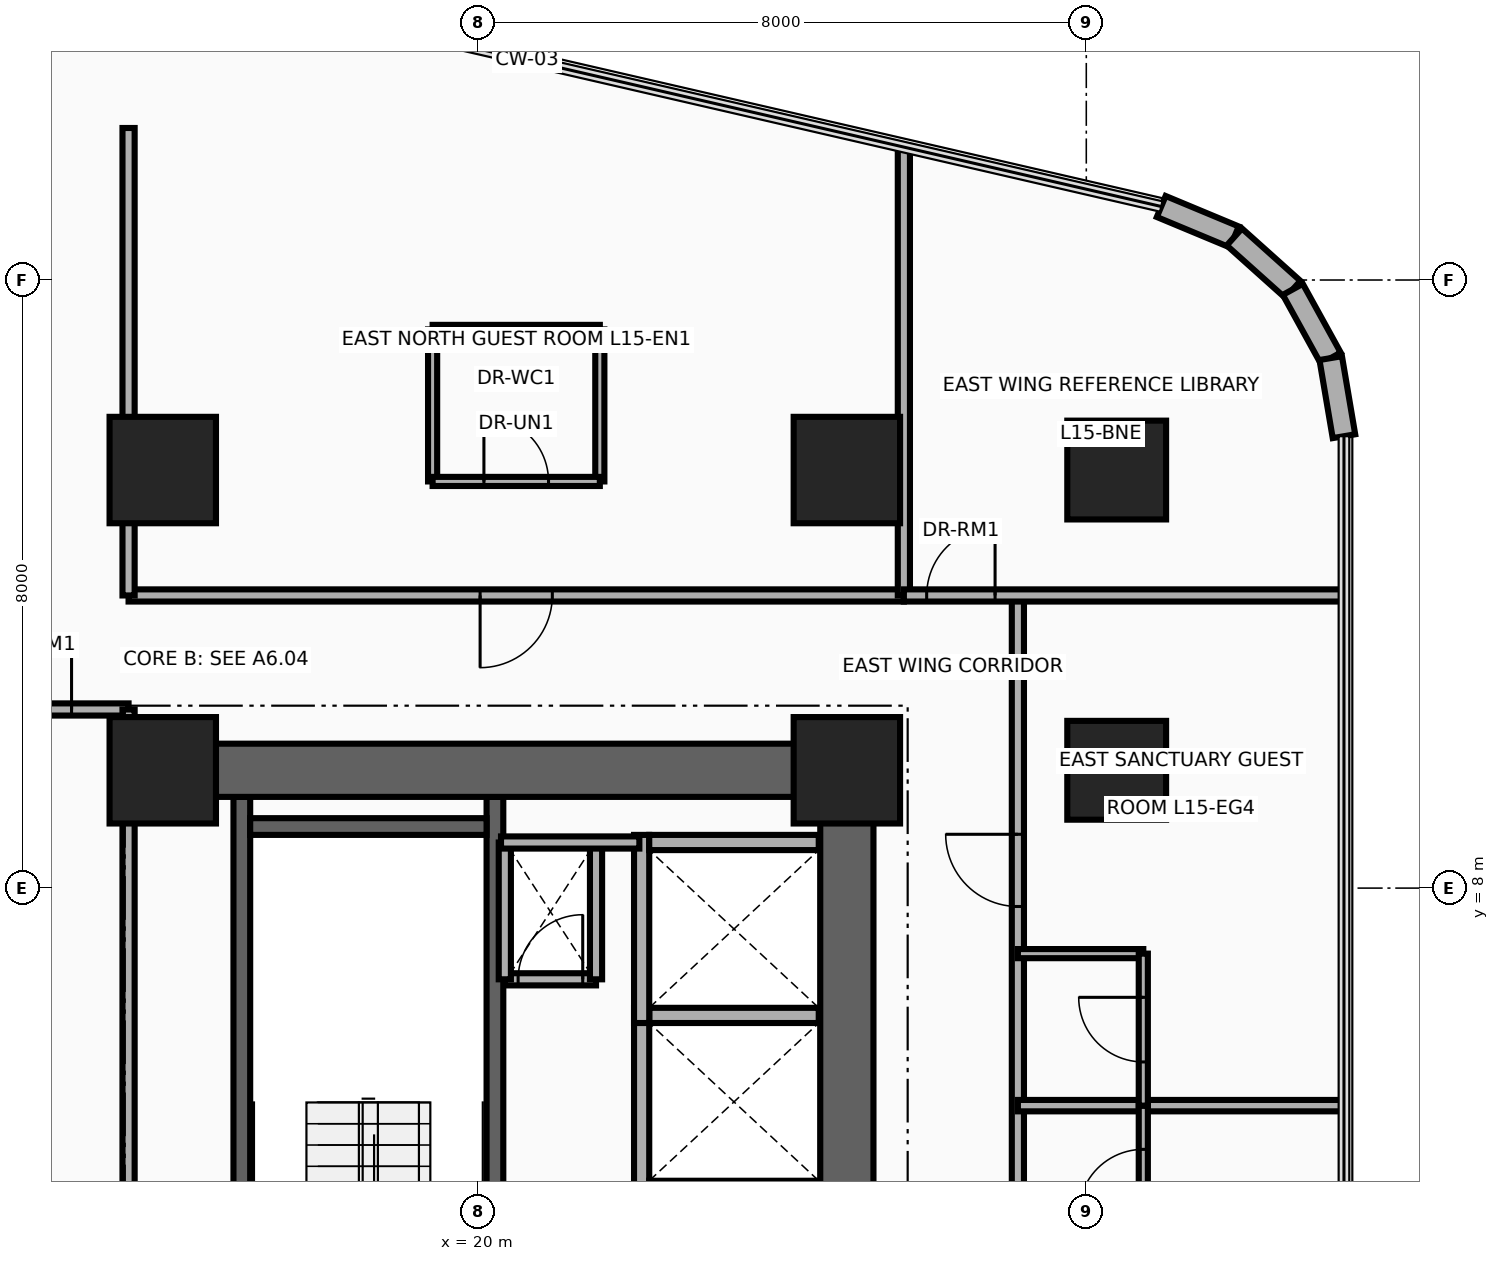
"""IFC4 building model, lengths in metres.
Left out: names, types, materials, properties, quantities, classifications, styles, units other than length and angle.
Written with IfcOpenShell. Run it as: python <this file> out.ifc"""

import sys

from ifc_helpers import new_model, si_unit, direction, frame, frame_2d, origin, origin_2d, place, context, subcontext, project, spatial, rectangle, circle, extrude, source, transform, mapped, element, fill, save


model = new_model("IFC4")
c1 = context("Model", 3, precision=1e-05, world=origin(), true_north=direction((0.0, 1.0)))
c2 = subcontext(c1, "Body", "Model", "MODEL_VIEW")
j1 = project(units=[si_unit("LENGTHUNIT", "METRE"), si_unit("PLANEANGLEUNIT", "RADIAN")], contexts=[c1])
p1 = place(None, origin())
s1 = spatial("IfcSite", under=j1, at=p1, CompositionType="ELEMENT")
p2 = place(p1, origin())
s2 = spatial("IfcBuilding", under=s1, at=p2, CompositionType="ELEMENT")
p3 = place(p2, frame((0.0, 0.0, 63.0)))
s3 = spatial("IfcBuildingStorey", under=s2, at=p3, CompositionType="ELEMENT", Elevation=63.0)
for number, where, z_axis, x_axis in (
    (1, (16.89, 0.68, 0.0), (0.0, 0.0, 1.0), (0.0, 1.0, 0.0)),
    (2, (20.22, 0.68, 0.0), (0.0, 0.0, 1.0), (0.0, 1.0, 0.0)),
):
    element("IfcWall", number, at=place(p3, frame(where, z_axis=z_axis, x_axis=x_axis)), inside=s3, PredefinedType="SHEAR", context=c2, shape_type="SweptSolid", body=[
        extrude(rectangle(XDim=8.52, YDim=0.22, at=frame_2d((4.26, 0.0))), origin(), (0.0, 0.0, 1.0), 3.46),
    ])
p4 = place(p3, frame((17.0, 8.81, 0.0), z_axis=(0.0, 0.0, 1.0), x_axis=(1.0, 0.0, 0.0)))
e3 = element("IfcWall", 3, at=p4, inside=s3, PredefinedType="SHEAR", context=c2, shape_type="SweptSolid", body=[
    extrude(rectangle(XDim=3.11, YDim=0.22, at=frame_2d((1.555, 0.0))), origin(), (0.0, 0.0, 1.0), 3.46),
])
p5 = place(p3, frame((24.85, 0.95, 0.0), z_axis=(0.0, 0.0, 1.0), x_axis=(0.0, 1.0, 0.0)))
e4 = element("IfcWall", 4, at=p5, inside=s3, PredefinedType="SHEAR", context=c2, shape_type="SweptSolid", body=[
    extrude(rectangle(XDim=8.95, YDim=0.7, at=frame_2d((4.475, 0.0))), origin(), (0.0, 0.0, 1.0), 3.46),
])
p6 = place(p3, frame((15.85, 9.55, 0.0), z_axis=(0.0, 0.0, 1.0), x_axis=(1.0, 0.0, 0.0)))
e5 = element("IfcWall", 5, at=p6, inside=s3, PredefinedType="SHEAR", context=c2, shape_type="SweptSolid", body=[
    extrude(rectangle(XDim=9.0, YDim=0.7, at=frame_2d((4.5, 0.0))), origin(), (0.0, 0.0, 1.0), 3.46),
])
m1 = source(origin(), c2, "Body", "SweptSolid", [
    extrude(rectangle(XDim=1.4, YDim=1.4, at=origin_2d()), origin(), (0.0, 0.0, 1.0), 3.7),
])
for number, where, z_axis, x_axis in (
    (6, (15.85, 9.55, 0.0), (0.0, 0.0, 1.0), (1.0, 0.0, 0.0)),
    (7, (24.85, 9.55, 0.0), (0.0, 0.0, 1.0), (1.0, 0.0, 0.0)),
):
    element("IfcColumn", number, at=place(p3, frame(where, z_axis=z_axis, x_axis=x_axis)), inside=s3, PredefinedType="COLUMN", context=c2, shape_type="MappedRepresentation", body=[
        mapped(m1, transform((0.0, 0.0, 0.0), x_axis=(1.0, 0.0, 0.0), y_axis=(0.0, 1.0, 0.0), z_axis=(0.0, 0.0, 1.0), scale=1.0)),
    ])
m2 = source(origin(), c2, "Body", "SweptSolid", [
    extrude(circle(Radius=0.65, at=origin_2d()), origin(), (0.0, 0.0, 1.0), 3.7),
])
p7 = place(p3, frame((28.4, 9.55, 0.0), z_axis=(0.0, 0.0, 1.0), x_axis=(1.0, 0.0, 0.0)))
e8 = element("IfcColumn", 8, at=p7, inside=s3, PredefinedType="COLUMN", context=c2, shape_type="MappedRepresentation", body=[
    mapped(m2, transform((0.0, 0.0, 0.0), x_axis=(1.0, 0.0, 0.0), y_axis=(0.0, 1.0, 0.0), z_axis=(0.0, 0.0, 1.0), scale=1.0)),
])
for number, where, z_axis, x_axis in (
    (9, (15.85, 13.5, 0.0), (0.0, 0.0, 1.0), (1.0, 0.0, 0.0)),
    (10, (24.85, 13.5, 0.0), (0.0, 0.0, 1.0), (1.0, 0.0, 0.0)),
):
    element("IfcColumn", number, at=place(p3, frame(where, z_axis=z_axis, x_axis=x_axis)), inside=s3, PredefinedType="COLUMN", context=c2, shape_type="MappedRepresentation", body=[
        mapped(m1, transform((0.0, 0.0, 0.0), x_axis=(1.0, 0.0, 0.0), y_axis=(0.0, 1.0, 0.0), z_axis=(0.0, 0.0, 1.0), scale=1.0)),
    ])
p8 = place(p3, frame((28.4, 13.5, 0.0), z_axis=(0.0, 0.0, 1.0), x_axis=(1.0, 0.0, 0.0)))
e11 = element("IfcColumn", 11, at=p8, inside=s3, PredefinedType="COLUMN", context=c2, shape_type="MappedRepresentation", body=[
    mapped(m2, transform((0.0, 0.0, 0.0), x_axis=(1.0, 0.0, 0.0), y_axis=(0.0, 1.0, 0.0), z_axis=(0.0, 0.0, 1.0), scale=1.0)),
])
p9 = place(p3, frame((28.986, 16.967, 0.0), z_axis=(0.0, 0.0, 1.0), x_axis=(0.923083852684, -0.384598753136, 0.0)))
e12 = element("IfcWall", 12, at=p9, inside=s3, PredefinedType="SOLIDWALL", context=c2, shape_type="SweptSolid", body=[
    extrude(rectangle(XDim=1.042, YDim=0.3, at=frame_2d((0.521, 0.0))), origin(), (0.0, 0.0, 1.0), 3.46),
])
p10 = place(p3, frame((29.948, 16.566, 0.0), z_axis=(0.0, 0.0, 1.0), x_axis=(0.744585645533, -0.66752694063, 0.0)))
e13 = element("IfcWall", 13, at=p10, inside=s3, PredefinedType="SOLIDWALL", context=c2, shape_type="SweptSolid", body=[
    extrude(rectangle(XDim=1.033, YDim=0.3, at=frame_2d((0.517, 0.0))), origin(), (0.0, 0.0, 1.0), 3.46),
])
p11 = place(p3, frame((30.717, 15.877, 0.0), z_axis=(0.0, 0.0, 1.0), x_axis=(0.482971098131, -0.875636293429, 0.0)))
e14 = element("IfcWall", 14, at=p11, inside=s3, PredefinedType="SOLIDWALL", context=c2, shape_type="SweptSolid", body=[
    extrude(rectangle(XDim=1.033, YDim=0.3, at=frame_2d((0.516, 0.0))), origin(), (0.0, 0.0, 1.0), 3.46),
])
p12 = place(p3, frame((31.216, 14.973, 0.0), z_axis=(0.0, 0.0, 1.0), x_axis=(0.167019462117, -0.985953598946, 0.0)))
e15 = element("IfcWall", 15, at=p12, inside=s3, PredefinedType="SOLIDWALL", context=c2, shape_type="SweptSolid", body=[
    extrude(rectangle(XDim=1.042, YDim=0.3, at=frame_2d((0.521, 0.0))), origin(), (0.0, 0.0, 1.0), 3.46),
])
p13 = place(p3, frame((22.15, 3.95, 0.0), z_axis=(0.0, 0.0, 1.0), x_axis=(0.0, 1.0, 0.0)))
e16 = element("IfcWall", 16, at=p13, inside=s3, PredefinedType="MOVABLE", context=c2, shape_type="SweptSolid", body=[
    extrude(rectangle(XDim=2.475, YDim=0.2, at=frame_2d((1.238, 0.0))), origin(), (0.0, 0.0, 1.0), 3.46),
])
for number, where, z_axis, x_axis in (
    (17, (22.25, 4.05, 0.0), (0.0, 0.0, 1.0), (1.0, 0.0, 0.0)),
    (18, (22.25, 6.325, 0.0), (0.0, 0.0, 1.0), (1.0, 0.0, 0.0)),
):
    element("IfcWall", number, at=place(p3, frame(where, z_axis=z_axis, x_axis=x_axis)), inside=s3, PredefinedType="MOVABLE", context=c2, shape_type="SweptSolid", body=[
        extrude(rectangle(XDim=2.23, YDim=0.2, at=frame_2d((1.115, 0.0))), origin(), (0.0, 0.0, 1.0), 2.245),
    ])
p14 = place(p3, frame((22.15, 6.225, 0.0), z_axis=(0.0, 0.0, 1.0), x_axis=(0.0, 1.0, 0.0)))
e19 = element("IfcWall", 19, at=p14, inside=s3, PredefinedType="MOVABLE", context=c2, shape_type="SweptSolid", body=[
    extrude(rectangle(XDim=2.475, YDim=0.2, at=frame_2d((1.237, 0.0))), origin(), (0.0, 0.0, 1.0), 3.46),
])
p15 = place(p3, frame((22.25, 8.6, 0.0), z_axis=(0.0, 0.0, 1.0), x_axis=(1.0, 0.0, 0.0)))
e20 = element("IfcWall", 20, at=p15, inside=s3, PredefinedType="MOVABLE", context=c2, shape_type="SweptSolid", body=[
    extrude(rectangle(XDim=2.23, YDim=0.2, at=frame_2d((1.115, 0.0))), origin(), (0.0, 0.0, 1.0), 2.245),
])
p16 = place(p3, frame((20.35, 6.8, 0.0), z_axis=(0.0, 0.0, 1.0), x_axis=(1.0, 0.0, 0.0)))
e21 = element("IfcWall", 21, at=p16, inside=s3, PredefinedType="PARTITIONING", context=c2, shape_type="SweptSolid", body=[
    extrude(rectangle(XDim=1.2, YDim=0.16, at=frame_2d((0.6, 0.0))), origin(), (0.0, 0.0, 1.0), 3.46),
])
p17 = place(p16, frame((0.175, 0.0, 0.0)))
e22 = element("IfcOpeningElement", 22, at=p17, cuts=e21, PredefinedType="OPENING", context=c2, shape_type="SweptSolid", body=[
    extrude(rectangle(XDim=0.85, YDim=2.05, at=frame_2d((0.425, 1.025))), frame((0.0, 0.095, 0.0), z_axis=(0.0, -1.0, 0.0), x_axis=(1.0, 0.0, 0.0)), (0.0, 0.0, 1.0), 0.19),
])
for number, where, z_axis, x_axis in (
    (23, (21.55, 6.8, 0.0), (0.0, 0.0, 1.0), (0.0, 1.0, 0.0)),
    (24, (20.35, 6.8, 0.0), (0.0, 0.0, 1.0), (0.0, 1.0, 0.0)),
):
    element("IfcWall", number, at=place(p3, frame(where, z_axis=z_axis, x_axis=x_axis)), inside=s3, PredefinedType="PARTITIONING", context=c2, shape_type="SweptSolid", body=[
        extrude(rectangle(XDim=1.8, YDim=0.16, at=frame_2d((0.9, 0.0))), origin(), (0.0, 0.0, 1.0), 3.46),
    ])
p18 = place(p3, frame((20.3, 8.6, 0.0), z_axis=(0.0, 0.0, 1.0), x_axis=(1.0, 0.0, 0.0)))
e25 = element("IfcWall", 25, at=p18, inside=s3, PredefinedType="PARTITIONING", context=c2, shape_type="SweptSolid", body=[
    extrude(rectangle(XDim=1.82, YDim=0.16, at=frame_2d((0.91, 0.0))), origin(), (0.0, 0.0, 1.0), 3.46),
])
p19 = place(p3, frame((15.4, 11.85, 0.0), z_axis=(0.0, 0.0, 1.0), x_axis=(1.0, 0.0, 0.0)))
e26 = element("IfcWall", 26, at=p19, inside=s3, PredefinedType="PARTITIONING", context=c2, shape_type="SweptSolid", body=[
    extrude(rectangle(XDim=10.2, YDim=0.16, at=frame_2d((5.1, 0.0))), origin(), (0.0, 0.0, 1.0), 2.834),
])
p20 = place(p19, frame((4.625, 0.0, 0.0)))
e27 = element("IfcOpeningElement", 27, at=p20, cuts=e26, PredefinedType="OPENING", context=c2, shape_type="SweptSolid", body=[
    extrude(rectangle(XDim=0.95, YDim=2.15, at=frame_2d((0.475, 1.075))), frame((0.0, 0.095, 0.0), z_axis=(0.0, -1.0, 0.0), x_axis=(1.0, 0.0, 0.0)), (0.0, 0.0, 1.0), 0.19),
])
p21 = place(p3, frame((15.4, 11.85, 0.0), z_axis=(0.0, 0.0, 1.0), x_axis=(0.0, 1.0, 0.0)))
e28 = element("IfcWall", 28, at=p21, inside=s3, PredefinedType="PARTITIONING", context=c2, shape_type="SweptSolid", body=[
    extrude(rectangle(XDim=6.15, YDim=0.16, at=frame_2d((3.075, 0.0))), origin(), (0.0, 0.0, 1.0), 2.583),
])
p22 = place(p3, frame((25.6, 11.85, 0.0), z_axis=(0.0, 0.0, 1.0), x_axis=(0.0, 1.0, 0.0)))
e29 = element("IfcWall", 29, at=p22, inside=s3, PredefinedType="PARTITIONING", context=c2, shape_type="SweptSolid", body=[
    extrude(rectangle(XDim=5.898, YDim=0.16, at=frame_2d((2.949, 0.0))), origin(), (0.0, 0.0, 1.0), 2.583),
])
for number, where, z_axis, x_axis in (
    (30, (19.4, 13.35, 0.0), (0.0, 0.0, 1.0), (0.0, 1.0, 0.0)),
    (31, (21.6, 13.35, 0.0), (0.0, 0.0, 1.0), (0.0, 1.0, 0.0)),
):
    element("IfcWall", number, at=place(p3, frame(where, z_axis=z_axis, x_axis=x_axis)), inside=s3, PredefinedType="PARTITIONING", context=c2, shape_type="SweptSolid", body=[
        extrude(rectangle(XDim=2.0, YDim=0.12, at=frame_2d((1.0, 0.0))), origin(), (0.0, 0.0, 1.0), 2.583),
    ])
p23 = place(p3, frame((19.4, 15.35, 0.0), z_axis=(0.0, 0.0, 1.0), x_axis=(1.0, 0.0, 0.0)))
e32 = element("IfcWall", 32, at=p23, inside=s3, PredefinedType="PARTITIONING", context=c2, shape_type="SweptSolid", body=[
    extrude(rectangle(XDim=2.2, YDim=0.12, at=frame_2d((1.1, 0.0))), origin(), (0.0, 0.0, 1.0), 3.46),
])
p24 = place(p3, frame((19.4, 13.35, 0.0), z_axis=(0.0, 0.0, 1.0), x_axis=(1.0, 0.0, 0.0)))
e33 = element("IfcWall", 33, at=p24, inside=s3, PredefinedType="PARTITIONING", context=c2, shape_type="SweptSolid", body=[
    extrude(rectangle(XDim=2.2, YDim=0.12, at=frame_2d((1.1, 0.0))), origin(), (0.0, 0.0, 1.0), 2.583),
])
p25 = place(p24, frame((0.675, 0.0, 0.0)))
e34 = element("IfcOpeningElement", 34, at=p25, cuts=e33, PredefinedType="OPENING", context=c2, shape_type="SweptSolid", body=[
    extrude(rectangle(XDim=0.85, YDim=2.1, at=frame_2d((0.425, 1.05))), frame((0.0, 0.075, 0.0), z_axis=(0.0, -1.0, 0.0), x_axis=(1.0, 0.0, 0.0)), (0.0, 0.0, 1.0), 0.15),
])
p26 = place(p3, frame((27.1, -13.89, 0.0), z_axis=(0.0, 0.0, 1.0), x_axis=(0.0, 1.0, 0.0)))
e35 = element("IfcWall", 35, at=p26, inside=s3, PredefinedType="PARTITIONING", context=c2, shape_type="SweptSolid", body=[
    extrude(rectangle(XDim=25.74, YDim=0.16, at=frame_2d((12.87, 0.0))), origin(), (0.0, 0.0, 1.0), 2.583),
])
p27 = place(p26, frame((2.62, 0.0, 0.0)))
e36 = element("IfcOpeningElement", 36, at=p27, cuts=e35, PredefinedType="OPENING", context=c2, shape_type="SweptSolid", body=[
    extrude(rectangle(XDim=0.95, YDim=2.15, at=frame_2d((0.475, 1.075))), frame((0.0, 0.095, 0.0), z_axis=(0.0, -1.0, 0.0), x_axis=(1.0, 0.0, 0.0)), (0.0, 0.0, 1.0), 0.19),
])
p28 = place(p26, frame((8.484, 0.0, 0.0)))
e37 = element("IfcOpeningElement", 37, at=p28, cuts=e35, PredefinedType="OPENING", context=c2, shape_type="SweptSolid", body=[
    extrude(rectangle(XDim=0.95, YDim=2.15, at=frame_2d((0.475, 1.075))), frame((0.0, 0.095, 0.0), z_axis=(0.0, -1.0, 0.0), x_axis=(1.0, 0.0, 0.0)), (0.0, 0.0, 1.0), 0.19),
])
p29 = place(p26, frame((14.197, 0.0, 0.0)))
e38 = element("IfcOpeningElement", 38, at=p29, cuts=e35, PredefinedType="OPENING", context=c2, shape_type="SweptSolid", body=[
    extrude(rectangle(XDim=0.95, YDim=2.15, at=frame_2d((0.475, 1.075))), frame((0.0, 0.095, 0.0), z_axis=(0.0, -1.0, 0.0), x_axis=(1.0, 0.0, 0.0)), (0.0, 0.0, 1.0), 0.19),
])
p30 = place(p26, frame((21.648, 0.0, 0.0)))
e39 = element("IfcOpeningElement", 39, at=p30, cuts=e35, PredefinedType="OPENING", context=c2, shape_type="SweptSolid", body=[
    extrude(rectangle(XDim=0.95, YDim=2.15, at=frame_2d((0.475, 1.075))), frame((0.0, 0.095, 0.0), z_axis=(0.0, -1.0, 0.0), x_axis=(1.0, 0.0, 0.0)), (0.0, 0.0, 1.0), 0.19),
])
p31 = place(p3, frame((25.6, 11.85, 0.0), z_axis=(0.0, 0.0, 1.0), x_axis=(1.0, 0.0, 0.0)))
e40 = element("IfcWall", 40, at=p31, inside=s3, PredefinedType="PARTITIONING", context=c2, shape_type="SweptSolid", body=[
    extrude(rectangle(XDim=5.79, YDim=0.16, at=frame_2d((2.895, 0.0))), origin(), (0.0, 0.0, 1.0), 2.896),
])
p32 = place(p31, frame((0.3, 0.0, 0.0)))
e41 = element("IfcOpeningElement", 41, at=p32, cuts=e40, PredefinedType="OPENING", context=c2, shape_type="SweptSolid", body=[
    extrude(rectangle(XDim=0.9, YDim=2.1, at=frame_2d((0.45, 1.05))), frame((0.0, 0.095, 0.0), z_axis=(0.0, -1.0, 0.0), x_axis=(1.0, 0.0, 0.0)), (0.0, 0.0, 1.0), 0.19),
])
p33 = place(p3, frame((27.1, 5.138, 0.0), z_axis=(0.0, 0.0, 1.0), x_axis=(1.0, 0.0, 0.0)))
e42 = element("IfcWall", 42, at=p33, inside=s3, PredefinedType="PARTITIONING", context=c2, shape_type="SweptSolid", body=[
    extrude(rectangle(XDim=4.29, YDim=0.15, at=frame_2d((2.145, 0.0))), origin(), (0.0, 0.0, 1.0), 2.896),
])
p34 = place(p3, frame((28.75, 3.138, 0.0), z_axis=(0.0, 0.0, 1.0), x_axis=(0.0, 1.0, 0.0)))
e43 = element("IfcWall", 43, at=p34, inside=s3, PredefinedType="PARTITIONING", context=c2, shape_type="SweptSolid", body=[
    extrude(rectangle(XDim=2.0, YDim=0.12, at=frame_2d((1.0, 0.0))), origin(), (0.0, 0.0, 1.0), 3.46),
])
p35 = place(p34, frame((0.575, 0.0, 0.0)))
e44 = element("IfcOpeningElement", 44, at=p35, cuts=e43, PredefinedType="OPENING", context=c2, shape_type="SweptSolid", body=[
    extrude(rectangle(XDim=0.85, YDim=2.1, at=frame_2d((0.425, 1.05))), frame((0.0, 0.075, 0.0), z_axis=(0.0, -1.0, 0.0), x_axis=(1.0, 0.0, 0.0)), (0.0, 0.0, 1.0), 0.15),
])
p36 = place(p3, frame((27.1, 7.138, 0.0), z_axis=(0.0, 0.0, 1.0), x_axis=(1.0, 0.0, 0.0)))
e45 = element("IfcWall", 45, at=p36, inside=s3, PredefinedType="PARTITIONING", context=c2, shape_type="SweptSolid", body=[
    extrude(rectangle(XDim=1.65, YDim=0.12, at=frame_2d((0.825, 0.0))), origin(), (0.0, 0.0, 1.0), 2.896),
])
p37 = place(p3, frame((28.75, 5.138, 0.0), z_axis=(0.0, 0.0, 1.0), x_axis=(0.0, 1.0, 0.0)))
e46 = element("IfcWall", 46, at=p37, inside=s3, PredefinedType="PARTITIONING", context=c2, shape_type="SweptSolid", body=[
    extrude(rectangle(XDim=2.0, YDim=0.12, at=frame_2d((1.0, 0.0))), origin(), (0.0, 0.0, 1.0), 3.46),
])
p38 = place(p37, frame((0.575, 0.0, 0.0)))
e47 = element("IfcOpeningElement", 47, at=p38, cuts=e46, PredefinedType="OPENING", context=c2, shape_type="SweptSolid", body=[
    extrude(rectangle(XDim=0.85, YDim=2.1, at=frame_2d((0.425, 1.05))), frame((0.0, 0.075, 0.0), z_axis=(0.0, -1.0, 0.0), x_axis=(1.0, 0.0, 0.0)), (0.0, 0.0, 1.0), 0.15),
])
p39 = place(p3, frame((13.3, 10.35, 0.0), z_axis=(0.0, 0.0, 1.0), x_axis=(1.0, 0.0, 0.0)))
e48 = element("IfcWall", 48, at=p39, inside=s3, PredefinedType="PARTITIONING", context=c2, shape_type="SweptSolid", body=[
    extrude(rectangle(XDim=2.1, YDim=0.16, at=frame_2d((1.05, 0.0))), origin(), (0.0, 0.0, 1.0), 2.583),
])
p40 = place(p39, frame((0.45, 0.0, 0.0)))
e49 = element("IfcOpeningElement", 49, at=p40, cuts=e48, PredefinedType="OPENING", context=c2, shape_type="SweptSolid", body=[
    extrude(rectangle(XDim=0.9, YDim=2.1, at=frame_2d((0.45, 1.05))), frame((0.0, 0.095, 0.0), z_axis=(0.0, -1.0, 0.0), x_axis=(1.0, 0.0, 0.0)), (0.0, 0.0, 1.0), 0.19),
])
p41 = place(p3, frame((15.4, 1.0, 0.0), z_axis=(0.0, 0.0, 1.0), x_axis=(0.0, 1.0, 0.0)))
e50 = element("IfcWall", 50, at=p41, inside=s3, PredefinedType="PARTITIONING", context=c2, shape_type="SweptSolid", body=[
    extrude(rectangle(XDim=9.35, YDim=0.16, at=frame_2d((4.675, 0.0))), origin(), (0.0, 0.0, 1.0), 2.245),
])
p42 = place(p17, origin())
e51 = element("IfcDoor", 51, at=p42, inside=s3, OperationType="SINGLE_SWING_RIGHT", PredefinedType="DOOR", context=c2, shape_type="SweptSolid", body=[
    extrude(rectangle(XDim=0.85, YDim=2.05, at=frame_2d((0.425, 1.025))), frame((0.0, 0.025, 0.0), z_axis=(0.0, -1.0, 0.0), x_axis=(1.0, 0.0, 0.0)), (0.0, 0.0, 1.0), 0.05),
])
fill(e22, e51)
p43 = place(p20, frame((0.95, 0.0, 0.0), z_axis=(0.0, 0.0, 1.0), x_axis=(-1.0, 0.0, 0.0)))
e52 = element("IfcDoor", 52, at=p43, inside=s3, OperationType="SINGLE_SWING_LEFT", PredefinedType="DOOR", context=c2, shape_type="SweptSolid", body=[
    extrude(rectangle(XDim=0.95, YDim=2.15, at=frame_2d((0.475, 1.075))), frame((0.0, 0.025, 0.0), z_axis=(0.0, -1.0, 0.0), x_axis=(1.0, 0.0, 0.0)), (0.0, 0.0, 1.0), 0.05),
])
fill(e27, e52)
p44 = place(p25, origin())
e53 = element("IfcDoor", 53, at=p44, inside=s3, OperationType="SINGLE_SWING_RIGHT", PredefinedType="DOOR", context=c2, shape_type="SweptSolid", body=[
    extrude(rectangle(XDim=0.85, YDim=2.1, at=frame_2d((0.425, 1.05))), frame((0.0, 0.025, 0.0), z_axis=(0.0, -1.0, 0.0), x_axis=(1.0, 0.0, 0.0)), (0.0, 0.0, 1.0), 0.05),
])
fill(e34, e53)
p45 = place(p32, origin())
e54 = element("IfcDoor", 54, at=p45, inside=s3, OperationType="SINGLE_SWING_LEFT", PredefinedType="DOOR", context=c2, shape_type="SweptSolid", body=[
    extrude(rectangle(XDim=0.9, YDim=2.1, at=frame_2d((0.45, 1.05))), frame((0.0, 0.025, 0.0), z_axis=(0.0, -1.0, 0.0), x_axis=(1.0, 0.0, 0.0)), (0.0, 0.0, 1.0), 0.05),
])
fill(e41, e54)
p46 = place(p35, origin())
e55 = element("IfcDoor", 55, at=p46, inside=s3, OperationType="SINGLE_SWING_LEFT", PredefinedType="DOOR", context=c2, shape_type="SweptSolid", body=[
    extrude(rectangle(XDim=0.85, YDim=2.1, at=frame_2d((0.425, 1.05))), frame((0.0, 0.025, 0.0), z_axis=(0.0, -1.0, 0.0), x_axis=(1.0, 0.0, 0.0)), (0.0, 0.0, 1.0), 0.05),
])
fill(e44, e55)
p47 = place(p30, origin())
e56 = element("IfcDoor", 56, at=p47, inside=s3, OperationType="SINGLE_SWING_RIGHT", PredefinedType="DOOR", context=c2, shape_type="SweptSolid", body=[
    extrude(rectangle(XDim=0.95, YDim=2.15, at=frame_2d((0.475, 1.075))), frame((0.0, 0.025, 0.0), z_axis=(0.0, -1.0, 0.0), x_axis=(1.0, 0.0, 0.0)), (0.0, 0.0, 1.0), 0.05),
])
fill(e39, e56)
p48 = place(p38, origin())
e57 = element("IfcDoor", 57, at=p48, inside=s3, OperationType="SINGLE_SWING_LEFT", PredefinedType="DOOR", context=c2, shape_type="SweptSolid", body=[
    extrude(rectangle(XDim=0.85, YDim=2.1, at=frame_2d((0.425, 1.05))), frame((0.0, 0.025, 0.0), z_axis=(0.0, -1.0, 0.0), x_axis=(1.0, 0.0, 0.0)), (0.0, 0.0, 1.0), 0.05),
])
fill(e47, e57)
p49 = place(p40, origin())
e58 = element("IfcDoor", 58, at=p49, inside=s3, OperationType="SINGLE_SWING_RIGHT", PredefinedType="DOOR", context=c2, shape_type="SweptSolid", body=[
    extrude(rectangle(XDim=0.9, YDim=2.1, at=frame_2d((0.45, 1.05))), frame((0.0, 0.025, 0.0), z_axis=(0.0, -1.0, 0.0), x_axis=(1.0, 0.0, 0.0)), (0.0, 0.0, 1.0), 0.05),
])
fill(e49, e58)
save(model, sys.argv[1])
